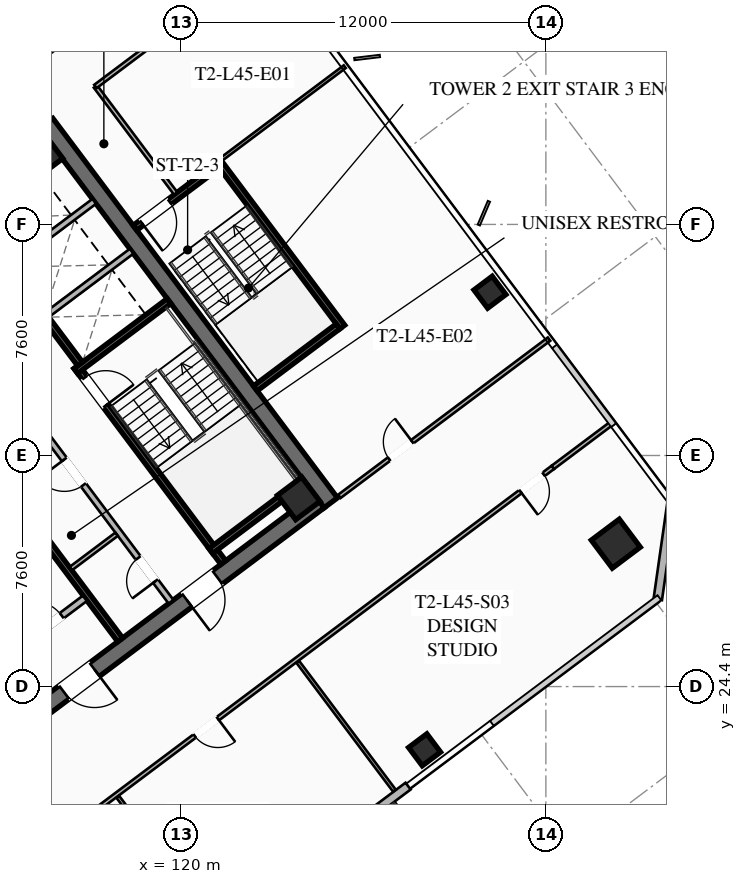
"""IFC4 building model, lengths in metres.
Left out: names, types, materials, properties, quantities, classifications, styles, units other than length and angle.
Written with IfcOpenShell. Run it as: python <this file> out.ifc"""

import sys

from ifc_helpers import new_model, si_unit, direction, frame, frame_2d, origin, origin_2d, place, context, subcontext, project, spatial, rectangle, hollow_rectangle, extrude, element, fill, save


model = new_model("IFC4")
c1 = context("Model", 3, precision=1e-05, world=origin(), true_north=direction((0.0, 1.0)))
c2 = subcontext(c1, "Body", "Model", "MODEL_VIEW")
j1 = project(units=[si_unit("LENGTHUNIT", "METRE"), si_unit("PLANEANGLEUNIT", "RADIAN")], contexts=[c1])
p1 = place(None, origin())
s1 = spatial("IfcSite", under=j1, at=p1, CompositionType="ELEMENT")
p2 = place(p1, origin())
s2 = spatial("IfcBuilding", under=s1, at=p2, CompositionType="ELEMENT")
p3 = place(p2, frame((0.0, 0.0, 167.65)))
s3 = spatial("IfcBuildingStorey", under=s2, at=p3, CompositionType="ELEMENT", Elevation=167.65)
p4 = place(p3, frame((115.564, 42.923, 0.0), z_axis=(0.0, 0.0, 1.0), x_axis=(0.600005007985, -0.799996243986, 0.0)))
e1 = element("IfcWall", 1, at=p4, inside=s3, PredefinedType="SHEAR", context=c2, shape_type="SweptSolid", body=[
    extrude(rectangle(XDim=15.6, YDim=0.55, at=frame_2d((7.8, 0.0))), origin(), (0.0, 0.0, 1.0), 3.55),
])
p5 = place(p3, frame((124.539, 30.498, 0.0), z_axis=(0.0, 0.0, 1.0), x_axis=(-0.799998054672, -0.600002593761, 0.0)))
e2 = element("IfcWall", 2, at=p5, inside=s3, PredefinedType="SHEAR", context=c2, shape_type="SweptSolid", body=[
    extrude(rectangle(XDim=15.06, YDim=0.55, at=frame_2d((7.53, 0.0))), origin(), (0.0, 0.0, 1.0), 3.55),
])
p6 = place(p5, frame((9.23, 0.0, 0.0)))
e3 = element("IfcOpeningElement", 3, at=p6, cuts=e2, PredefinedType="OPENING", context=c2, shape_type="SweptSolid", body=[
    extrude(rectangle(XDim=1.25, YDim=2.25, at=frame_2d((0.625, 1.125))), frame((0.0, 0.285, 0.0), z_axis=(0.0, -1.0, 0.0), x_axis=(1.0, 0.0, 0.0)), (0.0, 0.0, 1.0), 0.57),
])
p7 = place(p5, frame((4.18, 0.0, 0.0)))
e4 = element("IfcOpeningElement", 4, at=p7, cuts=e2, PredefinedType="OPENING", context=c2, shape_type="SweptSolid", body=[
    extrude(rectangle(XDim=1.25, YDim=2.25, at=frame_2d((0.625, 1.125))), frame((0.0, 0.285, 0.0), z_axis=(0.0, -1.0, 0.0), x_axis=(1.0, 0.0, 0.0)), (0.0, 0.0, 1.0), 0.57),
])
for number, where, z_axis, x_axis in (
    (5, (123.87, 30.59, 0.0), (0.0, 0.0, 1.0), (0.8, 0.6, 0.0)),
    (6, (115.41, 41.87, 0.0), (0.0, 0.0, 1.0), (0.8, 0.6, 0.0)),
):
    element("IfcColumn", number, at=place(p3, frame(where, z_axis=z_axis, x_axis=x_axis)), inside=s3, PredefinedType="COLUMN", context=c2, shape_type="SweptSolid", body=[
        extrude(hollow_rectangle(XDim=1.0, YDim=1.0, WallThickness=0.04, at=origin_2d()), origin(), (0.0, 0.0, 1.0), 3.37),
    ])
p8 = place(p3, frame((134.3, 29.1, 0.0), z_axis=(0.0, 0.0, 1.0), x_axis=(0.799999996291, 0.600000004945, 0.0)))
e7 = element("IfcColumn", 7, at=p8, inside=s3, PredefinedType="COLUMN", context=c2, shape_type="SweptSolid", body=[
    extrude(hollow_rectangle(XDim=1.15, YDim=1.15, WallThickness=0.045, at=origin_2d()), origin(), (0.0, 0.0, 1.0), 3.37),
])
for number, where, z_axis, x_axis in (
    (8, (128.01, 22.32, 0.0), (0.0, 0.0, 1.0), (0.8, 0.6, 0.0)),
    (9, (130.16, 37.37, 0.0), (0.0, 0.0, 1.0), (0.8, 0.6, 0.0)),
):
    element("IfcColumn", number, at=place(p3, frame(where, z_axis=z_axis, x_axis=x_axis)), inside=s3, PredefinedType="COLUMN", context=c2, shape_type="SweptSolid", body=[
        extrude(hollow_rectangle(XDim=0.75, YDim=0.75, WallThickness=0.032, at=origin_2d()), origin(), (0.0, 0.0, 1.0), 3.37),
    ])
p9 = place(p3, frame((127.468, 21.126, 0.0), z_axis=(0.0, 0.0, 1.0), x_axis=(-0.799996553335, -0.600004595526, 0.0)))
e10 = element("IfcWall", 10, at=p9, inside=s3, PredefinedType="SOLIDWALL", context=c2, shape_type="SweptSolid", body=[
    extrude(rectangle(XDim=8.5, YDim=0.28, at=frame_2d((4.25, 0.0))), origin(), (0.0, 0.0, 1.0), 3.37),
])
p10 = place(p9, frame((3.6, 0.0, 0.0)))
e11 = element("IfcOpeningElement", 11, at=p10, cuts=e10, PredefinedType="OPENING", context=c2, shape_type="SweptSolid", body=[
    extrude(rectangle(XDim=1.3, YDim=2.15, at=frame_2d((0.65, 1.075))), frame((0.0, 0.15, 0.0), z_axis=(0.0, -1.0, 0.0), x_axis=(1.0, 0.0, 0.0)), (0.0, 0.0, 1.0), 0.3),
])
p11 = place(p9, frame((1.46, 0.0, 0.85)))
e12 = element("IfcOpeningElement", 12, at=p11, cuts=e10, PredefinedType="OPENING", context=c2, shape_type="SweptSolid", body=[
    extrude(rectangle(XDim=1.8, YDim=1.92, at=frame_2d((0.9, 0.96))), frame((0.0, 0.15, 0.0), z_axis=(0.0, -1.0, 0.0), x_axis=(1.0, 0.0, 0.0)), (0.0, 0.0, 1.0), 0.3),
])
p12 = place(p3, frame((136.14, 30.48, 0.0), z_axis=(0.0, 0.0, 1.0), x_axis=(-0.141410847992, -0.989950994782, 0.0)))
e13 = element("IfcWall", 13, at=p12, inside=s3, PredefinedType="SOLIDWALL", context=c2, shape_type="SweptSolid", body=[
    extrude(rectangle(XDim=3.253, YDim=0.28, at=frame_2d((1.626, 0.0))), origin(), (0.0, 0.0, 1.0), 3.37),
])
p13 = place(p3, frame((116.56, 34.92, 0.0), z_axis=(0.0, 0.0, 1.0), x_axis=(0.59999029481, -0.8000072788, 0.0)))
e14 = element("IfcWall", 14, at=p13, inside=s3, PredefinedType="SHEAR", context=c2, shape_type="SweptSolid", body=[
    extrude(rectangle(XDim=8.05, YDim=0.2, at=frame_2d((4.025, 0.0))), origin(), (0.0, 0.0, 1.0), 3.37),
])
p14 = place(p13, frame((0.45, 0.0, 0.0)))
e15 = element("IfcOpeningElement", 15, at=p14, cuts=e14, PredefinedType="OPENING", context=c2, shape_type="SweptSolid", body=[
    extrude(rectangle(XDim=1.15, YDim=2.2, at=frame_2d((0.575, 1.1))), frame((0.0, 0.11, 0.0), z_axis=(0.0, -1.0, 0.0), x_axis=(1.0, 0.0, 0.0)), (0.0, 0.0, 1.0), 0.22),
])
for number, where, z_axis, x_axis in (
    (16, (116.54, 34.78, 0.0), (0.0, 0.0, 1.0), (0.8, 0.6, 0.0)),
    (17, (120.98, 28.86, 0.0), (0.0, 0.0, 1.0), (0.8, 0.6, 0.0)),
):
    element("IfcWall", number, at=place(p3, frame(where, z_axis=z_axis, x_axis=x_axis)), inside=s3, PredefinedType="SHEAR", context=c2, shape_type="SweptSolid", body=[
        extrude(rectangle(XDim=3.83, YDim=0.2, at=frame_2d((1.915, 0.0))), origin(), (0.0, 0.0, 1.0), 3.37),
    ])
p15 = place(p3, frame((117.998, 25.936, 0.0), z_axis=(0.0, 0.0, 1.0), x_axis=(-0.600002693989, 0.799997979501, 0.0)))
e18 = element("IfcWall", 18, at=p15, inside=s3, PredefinedType="SHEAR", context=c2, shape_type="SweptSolid", body=[
    extrude(rectangle(XDim=14.5, YDim=0.2, at=frame_2d((7.25, 0.0))), origin(), (0.0, 0.0, 1.0), 3.37),
])
p16 = place(p3, frame((114.316, 25.412, 0.0), z_axis=(0.0, 0.0, 1.0), x_axis=(0.800018601094, 0.59997519774, 0.0)))
e19 = element("IfcWall", 19, at=p16, inside=s3, PredefinedType="SOLIDWALL", context=c2, shape_type="SweptSolid", body=[
    extrude(rectangle(XDim=3.15, YDim=0.22, at=frame_2d((1.575, 0.0))), origin(), (0.0, 0.0, 1.0), 2.723),
])
p17 = place(p16, frame((0.95, 0.0, 0.0)))
e20 = element("IfcOpeningElement", 20, at=p17, cuts=e19, PredefinedType="OPENING", context=c2, shape_type="SweptSolid", body=[
    extrude(rectangle(XDim=1.25, YDim=2.25, at=frame_2d((0.625, 1.125))), frame((0.0, 0.12, 0.0), z_axis=(0.0, -1.0, 0.0), x_axis=(1.0, 0.0, 0.0)), (0.0, 0.0, 1.0), 0.24),
])
p18 = place(p3, frame((112.81, 40.17, 0.0), z_axis=(0.0, 0.0, 1.0), x_axis=(0.599993943644, -0.800004542231, 0.0)))
e21 = element("IfcWall", 21, at=p18, inside=s3, PredefinedType="SHEAR", context=c2, shape_type="SweptSolid", body=[
    extrude(rectangle(XDim=6.45, YDim=0.2, at=frame_2d((3.225, 0.0))), origin(), (0.0, 0.0, 1.0), 3.37),
])
for number, where, z_axis, x_axis in (
    (22, (115.59, 36.63, 0.0), (0.0, 0.0, 1.0), (0.8, 0.6, 0.0)),
    (23, (114.36, 38.27, 0.0), (0.0, 0.0, 1.0), (0.8, 0.6, 0.0)),
):
    element("IfcWall", number, at=place(p3, frame(where, z_axis=z_axis, x_axis=x_axis)), inside=s3, PredefinedType="SOLIDWALL", context=c2, shape_type="SweptSolid", body=[
        extrude(rectangle(XDim=3.48, YDim=0.2, at=frame_2d((1.74, 0.0))), origin(), (0.0, 0.0, 1.0), 3.37),
    ])
p19 = place(p3, frame((119.67, 27.19, 0.0), z_axis=(0.0, 0.0, 1.0), x_axis=(-0.599988677396, 0.800008491828, 0.0)))
e24 = element("IfcWall", 24, at=p19, inside=s3, PredefinedType="SOLIDWALL", context=c2, shape_type="SweptSolid", body=[
    extrude(rectangle(XDim=6.9, YDim=0.2, at=frame_2d((3.45, 0.0))), origin(), (0.0, 0.0, 1.0), 2.723),
])
p20 = place(p19, frame((0.85, 0.0, 0.0)))
e25 = element("IfcOpeningElement", 25, at=p20, cuts=e24, PredefinedType="OPENING", context=c2, shape_type="SweptSolid", body=[
    extrude(rectangle(XDim=0.95, YDim=2.05, at=frame_2d((0.475, 1.025))), frame((0.0, 0.11, 0.0), z_axis=(0.0, -1.0, 0.0), x_axis=(1.0, 0.0, 0.0)), (0.0, 0.0, 1.0), 0.22),
])
p21 = place(p19, frame((4.8, 0.0, 0.0)))
e26 = element("IfcOpeningElement", 26, at=p21, cuts=e24, PredefinedType="OPENING", context=c2, shape_type="SweptSolid", body=[
    extrude(rectangle(XDim=1.05, YDim=2.2, at=frame_2d((0.525, 1.1))), frame((0.0, 0.11, 0.0), z_axis=(0.0, -1.0, 0.0), x_axis=(1.0, 0.0, 0.0)), (0.0, 0.0, 1.0), 0.22),
])
p22 = place(p3, frame((116.376, 28.282, 0.0), z_axis=(0.0, 0.0, 1.0), x_axis=(0.8, 0.6, 0.0)))
e27 = element("IfcWall", 27, at=p22, inside=s3, PredefinedType="PARTITIONING", context=c2, shape_type="SweptSolid", body=[
    extrude(rectangle(XDim=1.88, YDim=0.135, at=frame_2d((0.94, 0.0))), origin(), (0.0, 0.0, 1.0), 2.723),
])
p23 = place(p3, frame((125.304, 36.228, 0.0), z_axis=(0.0, 0.0, 1.0), x_axis=(-0.59998851072, 0.800008616831, 0.0)))
e28 = element("IfcWall", 28, at=p23, inside=s3, PredefinedType="SHEAR", context=c2, shape_type="SweptSolid", body=[
    extrude(rectangle(XDim=6.8, YDim=0.2, at=frame_2d((3.4, 0.0))), origin(), (0.0, 0.0, 1.0), 3.37),
])
p24 = place(p3, frame((121.204, 41.528, 0.0), z_axis=(0.0, 0.0, 1.0), x_axis=(-0.800017232136, -0.599977023131, 0.0)))
e29 = element("IfcWall", 29, at=p24, inside=s3, PredefinedType="SHEAR", context=c2, shape_type="SweptSolid", body=[
    extrude(rectangle(XDim=3.4, YDim=0.2, at=frame_2d((1.7, 0.0))), origin(), (0.0, 0.0, 1.0), 3.37),
])
p25 = place(p24, frame((1.975, 0.0, 0.0)))
e30 = element("IfcOpeningElement", 30, at=p25, cuts=e29, PredefinedType="OPENING", context=c2, shape_type="SweptSolid", body=[
    extrude(rectangle(XDim=1.15, YDim=2.2, at=frame_2d((0.575, 1.1))), frame((0.0, 0.11, 0.0), z_axis=(0.0, -1.0, 0.0), x_axis=(1.0, 0.0, 0.0)), (0.0, 0.0, 1.0), 0.22),
])
p26 = place(p3, frame((122.444, 34.208, 0.0), z_axis=(0.0, 0.0, 1.0), x_axis=(0.79999138319, 0.600011488909, 0.0)))
e31 = element("IfcWall", 31, at=p26, inside=s3, PredefinedType="SHEAR", context=c2, shape_type="SweptSolid", body=[
    extrude(rectangle(XDim=3.4, YDim=0.2, at=frame_2d((1.7, 0.0))), origin(), (0.0, 0.0, 1.0), 3.37),
])
p27 = place(p3, frame((119.824, 40.618, 0.0), z_axis=(0.0, 0.0, 1.0), x_axis=(-0.599982243973, 0.800013316712, 0.0)))
e32 = element("IfcWall", 32, at=p27, inside=s3, PredefinedType="PARTITIONING", context=c2, shape_type="SweptSolid", body=[
    extrude(rectangle(XDim=4.4, YDim=0.135, at=frame_2d((2.2, 0.0))), origin(), (0.0, 0.0, 1.0), 2.723),
])
p28 = place(p3, frame((96.748, 31.086, 0.0), z_axis=(0.0, 0.0, 1.0), x_axis=(0.8, 0.6, 0.0)))
e33 = element("IfcWall", 33, at=p28, inside=s3, PredefinedType="PARTITIONING", context=c2, shape_type="SweptSolid", body=[
    extrude(rectangle(XDim=28.7, YDim=0.135, at=frame_2d((14.35, 0.0))), origin(), (0.0, 0.0, 1.0), 2.723),
])
p29 = place(p28, frame((0.3, 0.0, 0.0)))
e34 = element("IfcOpeningElement", 34, at=p29, cuts=e33, PredefinedType="OPENING", context=c2, shape_type="SweptSolid", body=[
    extrude(rectangle(XDim=0.95, YDim=2.05, at=frame_2d((0.475, 1.025))), frame((0.0, 0.077, 0.0), z_axis=(0.0, -1.0, 0.0), x_axis=(1.0, 0.0, 0.0)), (0.0, 0.0, 1.0), 0.155),
])
p30 = place(p28, frame((13.999, 0.0, 0.0)))
e35 = element("IfcOpeningElement", 35, at=p30, cuts=e33, PredefinedType="OPENING", context=c2, shape_type="SweptSolid", body=[
    extrude(rectangle(XDim=0.95, YDim=2.05, at=frame_2d((0.475, 1.025))), frame((0.0, 0.077, 0.0), z_axis=(0.0, -1.0, 0.0), x_axis=(1.0, 0.0, 0.0)), (0.0, 0.0, 1.0), 0.155),
])
p31 = place(p28, frame((27.45, 0.0, 0.0)))
e36 = element("IfcOpeningElement", 36, at=p31, cuts=e33, PredefinedType="OPENING", context=c2, shape_type="SweptSolid", body=[
    extrude(rectangle(XDim=0.95, YDim=2.05, at=frame_2d((0.475, 1.025))), frame((0.0, 0.077, 0.0), z_axis=(0.0, -1.0, 0.0), x_axis=(1.0, 0.0, 0.0)), (0.0, 0.0, 1.0), 0.155),
])
p32 = place(p3, frame((132.23, 31.61, 0.0), z_axis=(0.0, 0.0, 1.0), x_axis=(-0.799995916807, -0.600005444218, 0.0)))
e37 = element("IfcWall", 37, at=p32, inside=s3, PredefinedType="PARTITIONING", context=c2, shape_type="SweptSolid", body=[
    extrude(rectangle(XDim=28.7, YDim=0.135, at=frame_2d((14.35, 0.0))), origin(), (0.0, 0.0, 1.0), 2.723),
])
p33 = place(p32, frame((27.37, 0.0, 0.0)))
e38 = element("IfcOpeningElement", 38, at=p33, cuts=e37, PredefinedType="OPENING", context=c2, shape_type="SweptSolid", body=[
    extrude(rectangle(XDim=0.95, YDim=2.05, at=frame_2d((0.475, 1.025))), frame((0.0, 0.077, 0.0), z_axis=(0.0, -1.0, 0.0), x_axis=(1.0, 0.0, 0.0)), (0.0, 0.0, 1.0), 0.155),
])
p34 = place(p32, frame((13.775, 0.0, 0.0)))
e39 = element("IfcOpeningElement", 39, at=p34, cuts=e37, PredefinedType="OPENING", context=c2, shape_type="SweptSolid", body=[
    extrude(rectangle(XDim=0.95, YDim=2.05, at=frame_2d((0.475, 1.025))), frame((0.0, 0.077, 0.0), z_axis=(0.0, -1.0, 0.0), x_axis=(1.0, 0.0, 0.0)), (0.0, 0.0, 1.0), 0.155),
])
p35 = place(p32, frame((0.38, 0.0, 0.0)))
e40 = element("IfcOpeningElement", 40, at=p35, cuts=e37, PredefinedType="OPENING", context=c2, shape_type="SweptSolid", body=[
    extrude(rectangle(XDim=0.95, YDim=2.05, at=frame_2d((0.475, 1.025))), frame((0.0, 0.077, 0.0), z_axis=(0.0, -1.0, 0.0), x_axis=(1.0, 0.0, 0.0)), (0.0, 0.0, 1.0), 0.155),
])
p36 = place(p3, frame((132.23, 31.61, 0.0), z_axis=(0.0, 0.0, 1.0), x_axis=(0.800012055778, 0.599983925293, 0.0)))
e41 = element("IfcWall", 41, at=p36, inside=s3, PredefinedType="PARTITIONING", context=c2, shape_type="SweptSolid", body=[
    extrude(rectangle(XDim=2.43, YDim=0.135, at=frame_2d((1.215, 0.0))), origin(), (0.0, 0.0, 1.0), 2.723),
])
for number, where, z_axis, x_axis in (
    (42, (121.098, 16.536, 0.0), (0.0, 0.0, 1.0), (-0.6, 0.8, 0.0)),
    (43, (127.018, 20.976, 0.0), (0.0, 0.0, 1.0), (-0.6, 0.8, 0.0)),
):
    element("IfcWall", number, at=place(p3, frame(where, z_axis=z_axis, x_axis=x_axis)), inside=s3, PredefinedType="PARTITIONING", context=c2, shape_type="SweptSolid", body=[
        extrude(rectangle(XDim=5.3, YDim=0.11, at=frame_2d((2.65, 0.0))), origin(), (0.0, 0.0, 1.0), 2.723),
    ])
p37 = place(p3, frame((122.744, 48.308, 0.0), z_axis=(0.0, 0.0, 1.0), x_axis=(-0.79997892247, -0.600028102345, 0.0)))
e44 = element("IfcWall", 44, at=p37, inside=s3, PredefinedType="PARTITIONING", context=c2, shape_type="SweptSolid", body=[
    extrude(rectangle(XDim=6.95, YDim=0.135, at=frame_2d((3.475, 0.0))), origin(), (0.0, 0.0, 1.0), 2.723),
])
p38 = place(p37, frame((3.35, 0.0, 0.0)))
e45 = element("IfcOpeningElement", 45, at=p38, cuts=e44, PredefinedType="OPENING", context=c2, shape_type="SweptSolid", body=[
    extrude(rectangle(XDim=0.95, YDim=2.05, at=frame_2d((0.475, 1.025))), frame((0.0, 0.077, 0.0), z_axis=(0.0, -1.0, 0.0), x_axis=(1.0, 0.0, 0.0)), (0.0, 0.0, 1.0), 0.155),
])
p39 = place(p3, frame((125.208, 30.656, 0.0), z_axis=(0.0, 0.0, 1.0), x_axis=(0.800006797429, 0.599990936654, 0.0)))
e46 = element("IfcWall", 46, at=p39, inside=s3, PredefinedType="PARTITIONING", context=c2, shape_type="SweptSolid", body=[
    extrude(rectangle(XDim=8.62, YDim=0.135, at=frame_2d((4.31, 0.0))), origin(), (0.0, 0.0, 1.0), 2.723),
])
p40 = place(p39, frame((2.045, 0.0, 0.0)))
e47 = element("IfcOpeningElement", 47, at=p40, cuts=e46, PredefinedType="OPENING", context=c2, shape_type="SweptSolid", body=[
    extrude(rectangle(XDim=0.95, YDim=2.05, at=frame_2d((0.475, 1.025))), frame((0.0, 0.077, 0.0), z_axis=(0.0, -1.0, 0.0), x_axis=(1.0, 0.0, 0.0)), (0.0, 0.0, 1.0), 0.155),
])
p41 = place(p3, frame((125.384, 44.788, 0.0), z_axis=(0.0, 0.0, 1.0), x_axis=(-0.8, -0.6, 0.0)))
e48 = element("IfcWall", 48, at=p41, inside=s3, PredefinedType="PARTITIONING", context=c2, shape_type="SweptSolid", body=[
    extrude(rectangle(XDim=5.1, YDim=0.11, at=frame_2d((2.55, 0.0))), origin(), (0.0, 0.0, 1.0), 2.723),
])
p42 = place(p6, origin())
e49 = element("IfcDoor", 49, at=p42, inside=s3, OperationType="SINGLE_SWING_LEFT", PredefinedType="DOOR", context=c2, shape_type="SweptSolid", body=[
    extrude(rectangle(XDim=1.25, YDim=2.25, at=frame_2d((0.625, 1.125))), frame((0.0, 0.025, 0.0), z_axis=(0.0, -1.0, 0.0), x_axis=(1.0, 0.0, 0.0)), (0.0, 0.0, 1.0), 0.05),
])
fill(e3, e49)
p43 = place(p7, origin())
e50 = element("IfcDoor", 50, at=p43, inside=s3, OperationType="SINGLE_SWING_RIGHT", PredefinedType="DOOR", context=c2, shape_type="SweptSolid", body=[
    extrude(rectangle(XDim=1.25, YDim=2.25, at=frame_2d((0.625, 1.125))), frame((0.0, 0.025, 0.0), z_axis=(0.0, -1.0, 0.0), x_axis=(1.0, 0.0, 0.0)), (0.0, 0.0, 1.0), 0.05),
])
fill(e4, e50)
p44 = place(p14, origin())
e51 = element("IfcDoor", 51, at=p44, inside=s3, OperationType="SINGLE_SWING_RIGHT", PredefinedType="DOOR", context=c2, shape_type="SweptSolid", body=[
    extrude(rectangle(XDim=1.15, YDim=2.2, at=frame_2d((0.575, 1.1))), frame((0.0, 0.025, 0.0), z_axis=(0.0, -1.0, 0.0), x_axis=(1.0, 0.0, 0.0)), (0.0, 0.0, 1.0), 0.05),
])
fill(e15, e51)
p45 = place(p17, origin())
e52 = element("IfcDoor", 52, at=p45, inside=s3, OperationType="SINGLE_SWING_LEFT", PredefinedType="DOOR", context=c2, shape_type="SweptSolid", body=[
    extrude(rectangle(XDim=1.25, YDim=2.25, at=frame_2d((0.625, 1.125))), frame((0.0, 0.025, 0.0), z_axis=(0.0, -1.0, 0.0), x_axis=(1.0, 0.0, 0.0)), (0.0, 0.0, 1.0), 0.05),
])
fill(e20, e52)
p46 = place(p20, origin())
e53 = element("IfcDoor", 53, at=p46, inside=s3, OperationType="SINGLE_SWING_LEFT", PredefinedType="DOOR", context=c2, shape_type="SweptSolid", body=[
    extrude(rectangle(XDim=0.95, YDim=2.05, at=frame_2d((0.475, 1.025))), frame((0.0, 0.025, 0.0), z_axis=(0.0, -1.0, 0.0), x_axis=(1.0, 0.0, 0.0)), (0.0, 0.0, 1.0), 0.05),
])
fill(e25, e53)
p47 = place(p21, origin())
e54 = element("IfcDoor", 54, at=p47, inside=s3, OperationType="SINGLE_SWING_RIGHT", PredefinedType="DOOR", context=c2, shape_type="SweptSolid", body=[
    extrude(rectangle(XDim=1.05, YDim=2.2, at=frame_2d((0.525, 1.1))), frame((0.0, 0.025, 0.0), z_axis=(0.0, -1.0, 0.0), x_axis=(1.0, 0.0, 0.0)), (0.0, 0.0, 1.0), 0.05),
])
fill(e26, e54)
p48 = place(p25, origin())
e55 = element("IfcDoor", 55, at=p48, inside=s3, OperationType="SINGLE_SWING_RIGHT", PredefinedType="DOOR", context=c2, shape_type="SweptSolid", body=[
    extrude(rectangle(XDim=1.15, YDim=2.2, at=frame_2d((0.575, 1.1))), frame((0.0, 0.025, 0.0), z_axis=(0.0, -1.0, 0.0), x_axis=(1.0, 0.0, 0.0)), (0.0, 0.0, 1.0), 0.05),
])
fill(e30, e55)
p49 = place(p34, origin())
e56 = element("IfcDoor", 56, at=p49, inside=s3, OperationType="SINGLE_SWING_LEFT", PredefinedType="DOOR", context=c2, shape_type="SweptSolid", body=[
    extrude(rectangle(XDim=0.95, YDim=2.05, at=frame_2d((0.475, 1.025))), frame((0.0, 0.025, 0.0), z_axis=(0.0, -1.0, 0.0), x_axis=(1.0, 0.0, 0.0)), (0.0, 0.0, 1.0), 0.05),
])
fill(e39, e56)
p50 = place(p35, origin())
e57 = element("IfcDoor", 57, at=p50, inside=s3, OperationType="SINGLE_SWING_RIGHT", PredefinedType="DOOR", context=c2, shape_type="SweptSolid", body=[
    extrude(rectangle(XDim=0.95, YDim=2.05, at=frame_2d((0.475, 1.025))), frame((0.0, 0.025, 0.0), z_axis=(0.0, -1.0, 0.0), x_axis=(1.0, 0.0, 0.0)), (0.0, 0.0, 1.0), 0.05),
])
fill(e40, e57)
p51 = place(p40, origin())
e58 = element("IfcDoor", 58, at=p51, inside=s3, OperationType="SINGLE_SWING_RIGHT", PredefinedType="DOOR", context=c2, shape_type="SweptSolid", body=[
    extrude(rectangle(XDim=0.95, YDim=2.05, at=frame_2d((0.475, 1.025))), frame((0.0, 0.025, 0.0), z_axis=(0.0, -1.0, 0.0), x_axis=(1.0, 0.0, 0.0)), (0.0, 0.0, 1.0), 0.05),
])
fill(e47, e58)
save(model, sys.argv[1])
